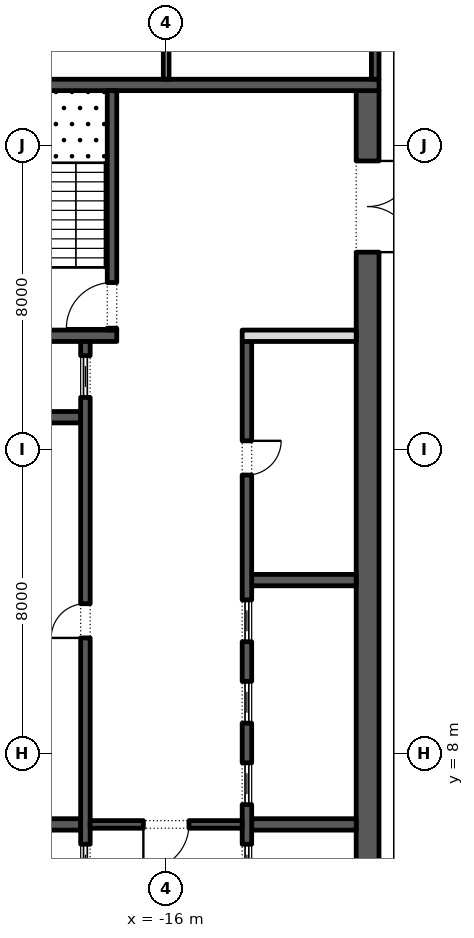
"""IFC4 building model, lengths in metres.
Left out: names, types, materials, properties, quantities, classifications, styles, units other than length and angle.
Written with IfcOpenShell. Run it as: python <this file> out.ifc"""

import sys

from ifc_helpers import new_model, si_unit, direction, frame, frame_2d, origin, place, context, subcontext, project, spatial, rectangle, extrude, element, fill, save


model = new_model("IFC4")
c1 = context("Model", 3, precision=1e-05, world=origin(), true_north=direction((0.0, 1.0)))
c2 = subcontext(c1, "Body", "Model", "MODEL_VIEW")
j1 = project(units=[si_unit("LENGTHUNIT", "METRE"), si_unit("PLANEANGLEUNIT", "RADIAN")], contexts=[c1])
p1 = place(None, origin())
s1 = spatial("IfcSite", under=j1, at=p1, CompositionType="ELEMENT")
p2 = place(p1, origin())
s2 = spatial("IfcBuilding", under=s1, at=p2, CompositionType="ELEMENT")
p3 = place(p2, frame((0.0, 0.0, 285.0)))
s3 = spatial("IfcBuildingStorey", under=s2, at=p3, CompositionType="ELEMENT", Elevation=285.0)
p4 = place(p3, frame((-10.7, -2.45, 0.0), z_axis=(0.0, 0.0, 1.0), x_axis=(0.0, 1.0, 0.0)))
e1 = element("IfcWall", 1, at=p4, inside=s3, PredefinedType="SHEAR", context=c2, shape_type="SweptSolid", body=[
    extrude(rectangle(XDim=27.9, YDim=0.6, at=frame_2d((13.95, 0.0))), origin(), (0.0, 0.0, 1.0), 4.0),
])
p5 = place(p4, frame((23.65, 0.0, 0.0)))
e2 = element("IfcOpeningElement", 2, at=p5, cuts=e1, PredefinedType="OPENING", context=c2, shape_type="SweptSolid", body=[
    extrude(rectangle(XDim=2.4, YDim=2.1, at=frame_2d((1.2, 1.05))), frame((0.0, 0.31, 0.0), z_axis=(0.0, -1.0, 0.0), x_axis=(1.0, 0.0, 0.0)), (0.0, 0.0, 1.0), 0.62),
])
p6 = place(p4, frame((1.087, 0.0, 0.0)))
e3 = element("IfcOpeningElement", 3, at=p6, cuts=e1, PredefinedType="OPENING", context=c2, shape_type="SweptSolid", body=[
    extrude(rectangle(XDim=0.9, YDim=2.1, at=frame_2d((0.45, 1.05))), frame((0.0, 0.31, 0.0), z_axis=(0.0, -1.0, 0.0), x_axis=(1.0, 0.0, 0.0)), (0.0, 0.0, 1.0), 0.62),
])
p7 = place(p4, frame((4.262, 0.0, 0.0)))
e4 = element("IfcOpeningElement", 4, at=p7, cuts=e1, PredefinedType="OPENING", context=c2, shape_type="SweptSolid", body=[
    extrude(rectangle(XDim=1.0, YDim=2.1, at=frame_2d((0.5, 1.05))), frame((0.0, 0.31, 0.0), z_axis=(0.0, -1.0, 0.0), x_axis=(1.0, 0.0, 0.0)), (0.0, 0.0, 1.0), 0.62),
])
p8 = place(p3, frame((-21.6, 25.6, 0.0), z_axis=(0.0, 0.0, 1.0), x_axis=(1.0, 0.0, 0.0)))
e5 = element("IfcWall", 5, at=p8, inside=s3, PredefinedType="SHEAR", context=c2, shape_type="SweptSolid", body=[
    extrude(rectangle(XDim=11.2, YDim=0.3, at=frame_2d((5.6, 0.0))), origin(), (0.0, 0.0, 1.0), 4.0),
])
p9 = place(p3, frame((-21.0, 19.0, 0.0), z_axis=(0.0, 0.0, 1.0), x_axis=(1.0, 0.0, 0.0)))
e6 = element("IfcWall", 6, at=p9, inside=s3, PredefinedType="SHEAR", context=c2, shape_type="SweptSolid", body=[
    extrude(rectangle(XDim=3.7, YDim=0.3, at=frame_2d((1.85, 0.0))), origin(), (0.0, 0.0, 1.0), 4.0),
])
p10 = place(p3, frame((-17.425, 19.15, 0.0), z_axis=(0.0, 0.0, 1.0), x_axis=(0.0, 1.0, 0.0)))
e7 = element("IfcWall", 7, at=p10, inside=s3, PredefinedType="SHEAR", context=c2, shape_type="SweptSolid", body=[
    extrude(rectangle(XDim=6.3, YDim=0.25, at=frame_2d((3.15, 0.0))), origin(), (0.0, 0.0, 1.0), 4.0),
])
p11 = place(p10, frame((0.05, 0.0, 0.0)))
e8 = element("IfcOpeningElement", 8, at=p11, cuts=e7, PredefinedType="OPENING", context=c2, shape_type="SweptSolid", body=[
    extrude(rectangle(XDim=1.2, YDim=2.1, at=frame_2d((0.6, 1.05))), frame((0.0, 0.135, 0.0), z_axis=(0.0, -1.0, 0.0), x_axis=(1.0, 0.0, 0.0)), (0.0, 0.0, 1.0), 0.27),
])
for number, where, z_axis, x_axis in (
    (9, (-21.0, 6.143, 0.0), (0.0, 0.0, 1.0), (1.0, 0.0, 0.0)),
    (10, (-21.0, 16.857, 0.0), (0.0, 0.0, 1.0), (1.0, 0.0, 0.0)),
):
    element("IfcWall", number, at=place(p3, frame(where, z_axis=z_axis, x_axis=x_axis)), inside=s3, PredefinedType="SHEAR", context=c2, shape_type="SweptSolid", body=[
        extrude(rectangle(XDim=2.75, YDim=0.3, at=frame_2d((1.375, 0.0))), origin(), (0.0, 0.0, 1.0), 4.0),
    ])
p12 = place(p3, frame((-18.125, 4.15, 0.0), z_axis=(0.0, 0.0, 1.0), x_axis=(0.0, 1.0, 0.0)))
e11 = element("IfcWall", 11, at=p12, inside=s3, PredefinedType="SHEAR", context=c2, shape_type="SweptSolid", body=[
    extrude(rectangle(XDim=14.7, YDim=0.25, at=frame_2d((7.35, 0.0))), origin(), (0.0, 0.0, 1.0), 4.0),
])
p13 = place(p12, frame((6.9, 0.0, 0.0)))
e12 = element("IfcOpeningElement", 12, at=p13, cuts=e11, PredefinedType="OPENING", context=c2, shape_type="SweptSolid", body=[
    extrude(rectangle(XDim=0.9, YDim=2.1, at=frame_2d((0.45, 1.05))), frame((0.0, 0.135, 0.0), z_axis=(0.0, -1.0, 0.0), x_axis=(1.0, 0.0, 0.0)), (0.0, 0.0, 1.0), 0.27),
])
p14 = place(p12, frame((0.371, 0.0, 0.0)))
e13 = element("IfcOpeningElement", 13, at=p14, cuts=e11, PredefinedType="OPENING", context=c2, shape_type="SweptSolid", body=[
    extrude(rectangle(XDim=1.1, YDim=2.1, at=frame_2d((0.55, 1.05))), frame((0.0, 0.135, 0.0), z_axis=(0.0, -1.0, 0.0), x_axis=(1.0, 0.0, 0.0)), (0.0, 0.0, 1.0), 0.27),
])
p15 = place(p12, frame((13.229, 0.0, 0.0)))
e14 = element("IfcOpeningElement", 14, at=p15, cuts=e11, PredefinedType="OPENING", context=c2, shape_type="SweptSolid", body=[
    extrude(rectangle(XDim=1.1, YDim=2.1, at=frame_2d((0.55, 1.05))), frame((0.0, 0.135, 0.0), z_axis=(0.0, -1.0, 0.0), x_axis=(1.0, 0.0, 0.0)), (0.0, 0.0, 1.0), 0.27),
])
for number, where, z_axis, x_axis in (
    (15, (-13.75, 6.143, 0.0), (0.0, 0.0, 1.0), (1.0, 0.0, 0.0)),
    (16, (-13.75, 12.571, 0.0), (0.0, 0.0, 1.0), (1.0, 0.0, 0.0)),
):
    element("IfcWall", number, at=place(p3, frame(where, z_axis=z_axis, x_axis=x_axis)), inside=s3, PredefinedType="SHEAR", context=c2, shape_type="SweptSolid", body=[
        extrude(rectangle(XDim=2.75, YDim=0.3, at=frame_2d((1.375, 0.0))), origin(), (0.0, 0.0, 1.0), 4.0),
    ])
p16 = place(p3, frame((-13.875, -2.45, 0.0), z_axis=(0.0, 0.0, 1.0), x_axis=(0.0, 1.0, 0.0)))
e17 = element("IfcWall", 17, at=p16, inside=s3, PredefinedType="SHEAR", context=c2, shape_type="SweptSolid", body=[
    extrude(rectangle(XDim=21.3, YDim=0.25, at=frame_2d((10.65, 0.0))), origin(), (0.0, 0.0, 1.0), 4.0),
])
p17 = place(p16, frame((17.786, 0.0, 0.0)))
e18 = element("IfcOpeningElement", 18, at=p17, cuts=e17, PredefinedType="OPENING", context=c2, shape_type="SweptSolid", body=[
    extrude(rectangle(XDim=0.9, YDim=2.1, at=frame_2d((0.45, 1.05))), frame((0.0, 0.135, 0.0), z_axis=(0.0, -1.0, 0.0), x_axis=(1.0, 0.0, 0.0)), (0.0, 0.0, 1.0), 0.27),
])
p18 = place(p16, frame((6.971, 0.0, 0.0)))
e19 = element("IfcOpeningElement", 19, at=p18, cuts=e17, PredefinedType="OPENING", context=c2, shape_type="SweptSolid", body=[
    extrude(rectangle(XDim=1.1, YDim=2.1, at=frame_2d((0.55, 1.05))), frame((0.0, 0.135, 0.0), z_axis=(0.0, -1.0, 0.0), x_axis=(1.0, 0.0, 0.0)), (0.0, 0.0, 1.0), 0.27),
])
p19 = place(p16, frame((9.114, 0.0, 0.0)))
e20 = element("IfcOpeningElement", 20, at=p19, cuts=e17, PredefinedType="OPENING", context=c2, shape_type="SweptSolid", body=[
    extrude(rectangle(XDim=1.1, YDim=2.1, at=frame_2d((0.55, 1.05))), frame((0.0, 0.135, 0.0), z_axis=(0.0, -1.0, 0.0), x_axis=(1.0, 0.0, 0.0)), (0.0, 0.0, 1.0), 0.27),
])
p20 = place(p16, frame((11.257, 0.0, 0.0)))
e21 = element("IfcOpeningElement", 21, at=p20, cuts=e17, PredefinedType="OPENING", context=c2, shape_type="SweptSolid", body=[
    extrude(rectangle(XDim=1.1, YDim=2.1, at=frame_2d((0.55, 1.05))), frame((0.0, 0.135, 0.0), z_axis=(0.0, -1.0, 0.0), x_axis=(1.0, 0.0, 0.0)), (0.0, 0.0, 1.0), 0.27),
])
p21 = place(p16, frame((13.4, 0.0, 0.0)))
e22 = element("IfcOpeningElement", 22, at=p21, cuts=e17, PredefinedType="OPENING", context=c2, shape_type="SweptSolid", body=[
    extrude(rectangle(XDim=1.1, YDim=2.1, at=frame_2d((0.55, 1.05))), frame((0.0, 0.135, 0.0), z_axis=(0.0, -1.0, 0.0), x_axis=(1.0, 0.0, 0.0)), (0.0, 0.0, 1.0), 0.27),
])
p22 = place(p3, frame((-14.0, 19.0, 0.0), z_axis=(0.0, 0.0, 1.0), x_axis=(1.0, 0.0, 0.0)))
e23 = element("IfcWall", 23, at=p22, inside=s3, PredefinedType="PARTITIONING", context=c2, shape_type="SweptSolid", body=[
    extrude(rectangle(XDim=3.0, YDim=0.3, at=frame_2d((1.5, 0.0))), origin(), (0.0, 0.0, 1.0), 4.0),
])
p23 = place(p3, frame((-18.0, 6.143, 0.0), z_axis=(0.0, 0.0, 1.0), x_axis=(1.0, 0.0, 0.0)))
e24 = element("IfcWall", 24, at=p23, inside=s3, PredefinedType="SHEAR", context=c2, shape_type="SweptSolid", body=[
    extrude(rectangle(XDim=4.0, YDim=0.2, at=frame_2d((2.0, 0.0))), origin(), (0.0, 0.0, 1.0), 4.0),
])
p24 = place(p23, frame((1.4, 0.0, 0.0)))
e25 = element("IfcOpeningElement", 25, at=p24, cuts=e24, PredefinedType="OPENING", context=c2, shape_type="SweptSolid", body=[
    extrude(rectangle(XDim=1.2, YDim=2.1, at=frame_2d((0.6, 1.05))), frame((0.0, 0.11, 0.0), z_axis=(0.0, -1.0, 0.0), x_axis=(1.0, 0.0, 0.0)), (0.0, 0.0, 1.0), 0.22),
])
p25 = place(p3, frame((-10.5, 25.75, 0.0), z_axis=(0.0, 0.0, 1.0), x_axis=(0.0, 1.0, 0.0)))
e26 = element("IfcWall", 26, at=p25, inside=s3, PredefinedType="SHEAR", context=c2, shape_type="SweptSolid", body=[
    extrude(rectangle(XDim=4.75, YDim=0.2, at=frame_2d((2.375, 0.0))), origin(), (0.0, 0.0, 1.0), 4.0),
])
p26 = place(p25, frame((1.925, 0.0, 0.0)))
e27 = element("IfcOpeningElement", 27, at=p26, cuts=e26, PredefinedType="OPENING", context=c2, shape_type="SweptSolid", body=[
    extrude(rectangle(XDim=0.9, YDim=2.1, at=frame_2d((0.45, 1.05))), frame((0.0, 0.11, 0.0), z_axis=(0.0, -1.0, 0.0), x_axis=(1.0, 0.0, 0.0)), (0.0, 0.0, 1.0), 0.22),
])
p27 = place(p3, frame((-16.0, 25.75, 0.0), z_axis=(0.0, 0.0, 1.0), x_axis=(0.0, 1.0, 0.0)))
e28 = element("IfcWall", 28, at=p27, inside=s3, PredefinedType="PARTITIONING", context=c2, shape_type="SweptSolid", body=[
    extrude(rectangle(XDim=4.75, YDim=0.15, at=frame_2d((2.375, 0.0))), origin(), (0.0, 0.0, 1.0), 4.0),
])
p28 = place(p13, origin())
e29 = element("IfcDoor", 29, at=p28, inside=s3, OperationType="SINGLE_SWING_RIGHT", PredefinedType="DOOR", context=c2, shape_type="SweptSolid", body=[
    extrude(rectangle(XDim=0.9, YDim=2.1, at=frame_2d((0.45, 1.05))), frame((0.0, 0.125, 0.0), z_axis=(0.0, -1.0, 0.0), x_axis=(1.0, 0.0, 0.0)), (0.0, 0.0, 1.0), 0.05),
])
fill(e12, e29)
p29 = place(p14, origin())
e30 = element("IfcDoor", 30, at=p29, inside=s3, OperationType="SLIDING_TO_LEFT", PredefinedType="DOOR", context=c2, shape_type="SweptSolid", body=[
    extrude(rectangle(XDim=1.1, YDim=2.1, at=frame_2d((0.55, 1.05))), frame((0.0, 0.025, 0.0), z_axis=(0.0, -1.0, 0.0), x_axis=(1.0, 0.0, 0.0)), (0.0, 0.0, 1.0), 0.05),
])
fill(e13, e30)
p30 = place(p15, origin())
e31 = element("IfcDoor", 31, at=p30, inside=s3, OperationType="SLIDING_TO_LEFT", PredefinedType="DOOR", context=c2, shape_type="SweptSolid", body=[
    extrude(rectangle(XDim=1.1, YDim=2.1, at=frame_2d((0.55, 1.05))), frame((0.0, 0.025, 0.0), z_axis=(0.0, -1.0, 0.0), x_axis=(1.0, 0.0, 0.0)), (0.0, 0.0, 1.0), 0.05),
])
fill(e14, e31)
p31 = place(p17, frame((0.9, -0.2, 0.0), z_axis=(0.0, 0.0, 1.0), x_axis=(-1.0, 0.0, 0.0)))
e32 = element("IfcDoor", 32, at=p31, inside=s3, OperationType="SINGLE_SWING_RIGHT", PredefinedType="DOOR", context=c2, shape_type="SweptSolid", body=[
    extrude(rectangle(XDim=0.9, YDim=2.1, at=frame_2d((0.45, 1.05))), frame((0.0, -0.075, 0.0), z_axis=(0.0, -1.0, 0.0), x_axis=(1.0, 0.0, 0.0)), (0.0, 0.0, 1.0), 0.05),
])
fill(e18, e32)
p32 = place(p18, origin())
e33 = element("IfcDoor", 33, at=p32, inside=s3, OperationType="SLIDING_TO_LEFT", PredefinedType="DOOR", context=c2, shape_type="SweptSolid", body=[
    extrude(rectangle(XDim=1.1, YDim=2.1, at=frame_2d((0.55, 1.05))), frame((0.0, 0.025, 0.0), z_axis=(0.0, -1.0, 0.0), x_axis=(1.0, 0.0, 0.0)), (0.0, 0.0, 1.0), 0.05),
])
fill(e19, e33)
p33 = place(p19, origin())
e34 = element("IfcDoor", 34, at=p33, inside=s3, OperationType="SLIDING_TO_LEFT", PredefinedType="DOOR", context=c2, shape_type="SweptSolid", body=[
    extrude(rectangle(XDim=1.1, YDim=2.1, at=frame_2d((0.55, 1.05))), frame((0.0, 0.025, 0.0), z_axis=(0.0, -1.0, 0.0), x_axis=(1.0, 0.0, 0.0)), (0.0, 0.0, 1.0), 0.05),
])
fill(e20, e34)
p34 = place(p20, origin())
e35 = element("IfcDoor", 35, at=p34, inside=s3, OperationType="SLIDING_TO_LEFT", PredefinedType="DOOR", context=c2, shape_type="SweptSolid", body=[
    extrude(rectangle(XDim=1.1, YDim=2.1, at=frame_2d((0.55, 1.05))), frame((0.0, 0.025, 0.0), z_axis=(0.0, -1.0, 0.0), x_axis=(1.0, 0.0, 0.0)), (0.0, 0.0, 1.0), 0.05),
])
fill(e21, e35)
p35 = place(p21, origin())
e36 = element("IfcDoor", 36, at=p35, inside=s3, OperationType="SLIDING_TO_LEFT", PredefinedType="DOOR", context=c2, shape_type="SweptSolid", body=[
    extrude(rectangle(XDim=1.1, YDim=2.1, at=frame_2d((0.55, 1.05))), frame((0.0, 0.025, 0.0), z_axis=(0.0, -1.0, 0.0), x_axis=(1.0, 0.0, 0.0)), (0.0, 0.0, 1.0), 0.05),
])
fill(e22, e36)
p36 = place(p24, frame((1.2, 0.0, 0.0), z_axis=(0.0, 0.0, 1.0), x_axis=(-1.0, 0.0, 0.0)))
e37 = element("IfcDoor", 37, at=p36, inside=s3, OperationType="SINGLE_SWING_LEFT", PredefinedType="DOOR", context=c2, shape_type="SweptSolid", body=[
    extrude(rectangle(XDim=1.2, YDim=2.1, at=frame_2d((0.6, 1.05))), frame((0.0, 0.025, 0.0), z_axis=(0.0, -1.0, 0.0), x_axis=(1.0, 0.0, 0.0)), (0.0, 0.0, 1.0), 0.05),
])
fill(e25, e37)
p37 = place(p5, frame((2.4, 0.0, 0.0), z_axis=(0.0, 0.0, 1.0), x_axis=(-1.0, 0.0, 0.0)))
e38 = element("IfcDoor", 38, at=p37, inside=s3, OperationType="DOUBLE_DOOR_SINGLE_SWING", PredefinedType="DOOR", context=c2, shape_type="SweptSolid", body=[
    extrude(rectangle(XDim=2.4, YDim=2.1, at=frame_2d((1.2, 1.05))), frame((0.0, 0.025, 0.0), z_axis=(0.0, -1.0, 0.0), x_axis=(1.0, 0.0, 0.0)), (0.0, 0.0, 1.0), 0.05),
])
fill(e2, e38)
p38 = place(p11, origin())
e39 = element("IfcDoor", 39, at=p38, inside=s3, OperationType="SINGLE_SWING_RIGHT", PredefinedType="DOOR", context=c2, shape_type="SweptSolid", body=[
    extrude(rectangle(XDim=1.2, YDim=2.1, at=frame_2d((0.6, 1.05))), frame((0.0, 0.025, 0.0), z_axis=(0.0, -1.0, 0.0), x_axis=(1.0, 0.0, 0.0)), (0.0, 0.0, 1.0), 0.05),
])
fill(e8, e39)
save(model, sys.argv[1])
